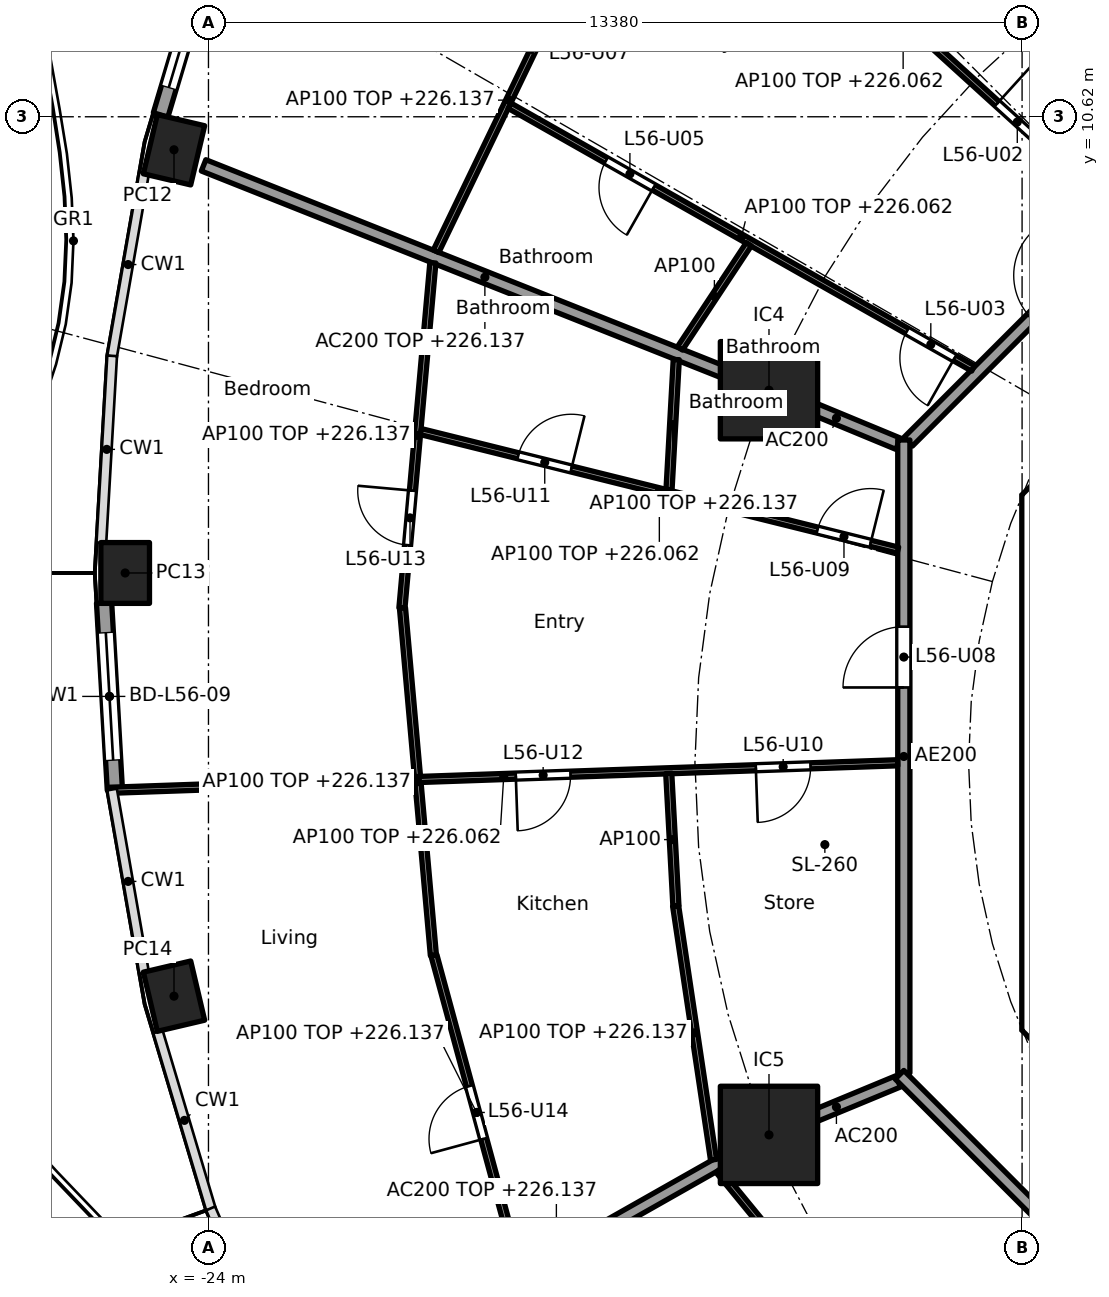
"""IFC4 building model, lengths in metres.
Left out: names, types, materials, properties, quantities, classifications, styles, units other than length and angle.
Written with IfcOpenShell. Run it as: python <this file> out.ifc"""

import sys

from ifc_helpers import new_model, si_unit, direction, frame, frame_2d, origin, origin_2d, place, context, subcontext, project, spatial, polyline, rectangle, hollow_rectangle, outline, extrude, element, fill, save


model = new_model("IFC4")
c1 = context("Model", 3, precision=1e-05, world=origin(), true_north=direction((0.0, 1.0)))
c2 = subcontext(c1, "Body", "Model", "MODEL_VIEW")
j1 = project(units=[si_unit("LENGTHUNIT", "METRE"), si_unit("PLANEANGLEUNIT", "RADIAN")], contexts=[c1])
p1 = place(None, origin())
s1 = spatial("IfcSite", under=j1, at=p1, CompositionType="ELEMENT")
p2 = place(p1, origin())
s2 = spatial("IfcBuilding", under=s1, at=p2, CompositionType="ELEMENT")
p3 = place(p2, frame((0.0, 0.0, 223.3)))
s3 = spatial("IfcBuildingStorey", under=s2, at=p3, CompositionType="ELEMENT", Elevation=223.3)
for number, where, z_axis, x_axis in (
    (1, (-24.567, 10.077, 0.0), (0.0, 0.0, 1.0), (-0.229, -0.973, 0.0)),
    (2, (-25.37, 3.118, 0.0), (0.0, 0.0, 1.0), (0.0, -1.0, 0.0)),
    (3, (-24.567, -3.842, 0.0), (0.0, 0.0, 1.0), (0.229, -0.973, 0.0)),
):
    element("IfcColumn", number, at=place(p3, frame(where, z_axis=z_axis, x_axis=x_axis)), inside=s3, PredefinedType="COLUMN", context=c2, shape_type="SweptSolid", body=[
        extrude(hollow_rectangle(XDim=1.0, YDim=0.8, WallThickness=0.032, at=origin_2d()), origin(), (0.0, 0.0, 1.0), 3.7),
    ])
for number, where, z_axis, x_axis in (
    (4, (-14.782, 6.123, 0.0), (0.0, 0.0, 1.0), (1.0, 0.0, 0.0)),
    (5, (-14.782, -6.123, 0.0), (0.0, 0.0, 1.0), (1.0, 0.0, 0.0)),
):
    element("IfcColumn", number, at=place(p3, frame(where, z_axis=z_axis, x_axis=x_axis)), inside=s3, PredefinedType="COLUMN", context=c2, shape_type="SweptSolid", body=[
        extrude(rectangle(XDim=1.6, YDim=1.6, at=origin_2d()), origin(), (0.0, 0.0, 1.0), 3.7),
    ])
p4 = place(p3, frame((-24.787, 10.65, 0.0), z_axis=(0.0, 0.0, 1.0), x_axis=(0.285859454825, 0.95827155446, 0.0)))
e6 = element("IfcWall", 6, at=p4, inside=s3, PredefinedType="SOLIDWALL", context=c2, shape_type="SweptSolid", body=[
    extrude(rectangle(XDim=3.041, YDim=0.25, at=frame_2d((1.52, 0.0))), origin(), (0.0, 0.0, 1.0), 3.44),
])
p5 = place(p4, frame((0.47, 0.0, 0.0)))
e7 = element("IfcOpeningElement", 7, at=p5, cuts=e6, PredefinedType="OPENING", context=c2, shape_type="SweptSolid", body=[
    extrude(rectangle(XDim=2.1, YDim=2.4, at=frame_2d((1.05, 1.2))), frame((0.0, 0.135, 0.0), z_axis=(0.0, -1.0, 0.0), x_axis=(1.0, 0.0, 0.0)), (0.0, 0.0, 1.0), 0.27),
])
p6 = place(p3, frame((-25.539, -0.45, 0.0), z_axis=(0.0, 0.0, 1.0), x_axis=(-0.057528189427, 0.998343882348, 0.0)))
e8 = element("IfcWall", 8, at=p6, inside=s3, PredefinedType="SOLIDWALL", context=c2, shape_type="SweptSolid", body=[
    extrude(rectangle(XDim=3.081, YDim=0.25, at=frame_2d((1.541, 0.0))), origin(), (0.0, 0.0, 1.0), 3.44),
])
p7 = place(p6, frame((0.49, 0.0, 0.0)))
e9 = element("IfcOpeningElement", 9, at=p7, cuts=e8, PredefinedType="OPENING", context=c2, shape_type="SweptSolid", body=[
    extrude(rectangle(XDim=2.1, YDim=2.4, at=frame_2d((1.05, 1.2))), frame((0.0, 0.135, 0.0), z_axis=(0.0, -1.0, 0.0), x_axis=(1.0, 0.0, 0.0)), (0.0, 0.0, 1.0), 0.27),
])
p8 = place(p3, frame((-10.325, 3.801, 0.0), z_axis=(0.0, 0.0, 1.0), x_axis=(0.0, -1.0, 0.0)))
e10 = element("IfcWall", 10, at=p8, inside=s3, PredefinedType="SHEAR", context=c2, shape_type="SweptSolid", body=[
    extrude(rectangle(XDim=7.602, YDim=0.6, at=frame_2d((3.801, 0.0))), origin(), (0.0, 0.0, 1.0), 3.44),
])
p9 = place(p8, frame((0.651, 0.0, 0.0)))
e11 = element("IfcOpeningElement", 11, at=p9, cuts=e10, PredefinedType="OPENING", context=c2, shape_type="SweptSolid", body=[
    extrude(rectangle(XDim=1.5, YDim=2.1, at=frame_2d((0.75, 1.05))), frame((0.0, 0.31, 0.0), z_axis=(0.0, -1.0, 0.0), x_axis=(1.0, 0.0, 0.0)), (0.0, 0.0, 1.0), 0.62),
])
p10 = place(p8, frame((5.451, 0.0, 0.0)))
e12 = element("IfcOpeningElement", 12, at=p10, cuts=e10, PredefinedType="OPENING", context=c2, shape_type="SweptSolid", body=[
    extrude(rectangle(XDim=1.5, YDim=2.1, at=frame_2d((0.75, 1.05))), frame((0.0, 0.31, 0.0), z_axis=(0.0, -1.0, 0.0), x_axis=(1.0, 0.0, 0.0)), (0.0, 0.0, 1.0), 0.62),
])
p11 = place(p3, origin())
e13 = element("IfcWall", 13, at=p11, inside=s3, PredefinedType="SHEAR", context=c2, shape_type="SweptSolid", body=[
    extrude(outline(polyline([(-10.625, -3.801), (-10.025, -3.801), (-10.025, -4.152), (-9.776, -4.401), (-10.2, -4.825), (-10.625, -4.401), (-10.625, -3.801)])), origin(), (0.0, 0.0, 1.0), 3.44),
])
p12 = place(p3, origin())
e14 = element("IfcWall", 14, at=p12, inside=s3, PredefinedType="SHEAR", context=c2, shape_type="SweptSolid", body=[
    extrude(outline(polyline([(-10.2, 4.825), (-9.776, 4.401), (-10.025, 4.152), (-10.025, 3.801), (-10.625, 3.801), (-10.625, 4.401), (-10.2, 4.825)])), origin(), (0.0, 0.0, 1.0), 3.44),
])
p13 = place(p3, frame((-12.657, 5.243, 0.0), z_axis=(0.0, 0.0, 1.0), x_axis=(-0.923859888513, 0.38273085373, 0.0)))
e15 = element("IfcWall", 15, at=p13, inside=s3, PredefinedType="PARTITIONING", context=c2, shape_type="SweptSolid", body=[
    extrude(rectangle(XDim=2.199, YDim=0.2, at=frame_2d((1.1, 0.0))), origin(), (0.0, 0.0, 1.0), 3.44),
])
p14 = place(p3, frame((-14.829, 6.141, 0.0), z_axis=(0.0, 0.0, 1.0), x_axis=(-0.929202069098, 0.36957206981, 0.0)))
e16 = element("IfcWall", 16, at=p14, inside=s3, PredefinedType="PARTITIONING", context=c2, shape_type="SweptSolid", body=[
    extrude(rectangle(XDim=9.957, YDim=0.2, at=frame_2d((4.978, 0.0))), origin(), (0.0, 0.0, 1.0), 2.837),
])
p15 = place(p3, frame((-12.657, -5.243, 0.0), z_axis=(0.0, 0.0, 1.0), x_axis=(-0.923859888513, -0.38273085373, 0.0)))
e17 = element("IfcWall", 17, at=p15, inside=s3, PredefinedType="PARTITIONING", context=c2, shape_type="SweptSolid", body=[
    extrude(rectangle(XDim=2.199, YDim=0.2, at=frame_2d((1.1, 0.0))), origin(), (0.0, 0.0, 1.0), 3.44),
])
p16 = place(p3, frame((-14.825, -6.148, 0.0), z_axis=(0.0, 0.0, 1.0), x_axis=(-0.870099576105, -0.492875975944, 0.0)))
e18 = element("IfcWall", 18, at=p16, inside=s3, PredefinedType="PARTITIONING", context=c2, shape_type="SweptSolid", body=[
    extrude(rectangle(XDim=7.937, YDim=0.2, at=frame_2d((3.969, 0.0))), origin(), (0.0, 0.0, 1.0), 2.837),
])
p17 = place(p3, frame((-5.275, 12.494, 0.0), z_axis=(0.0, 0.0, 1.0), x_axis=(-0.707106781187, -0.707106781187, 0.0)))
e19 = element("IfcWall", 19, at=p17, inside=s3, PredefinedType="PARTITIONING", context=c2, shape_type="SweptSolid", body=[
    extrude(rectangle(XDim=10.209, YDim=0.2, at=frame_2d((5.104, 0.0))), origin(), (0.0, 0.0, 1.0), 3.44),
])
p18 = place(p17, frame((6.339, 0.0, 0.0)))
e20 = element("IfcOpeningElement", 20, at=p18, cuts=e19, PredefinedType="OPENING", context=c2, shape_type="SweptSolid", body=[
    extrude(rectangle(XDim=1.0, YDim=2.1, at=frame_2d((0.5, 1.05))), frame((0.0, 0.11, 0.0), z_axis=(0.0, -1.0, 0.0), x_axis=(1.0, 0.0, 0.0)), (0.0, 0.0, 1.0), 0.22),
])
p19 = place(p3, frame((-12.565, 5.304, 0.0), z_axis=(0.0, 0.0, 1.0), x_axis=(0.0, -1.0, 0.0)))
e21 = element("IfcWall", 21, at=p19, inside=s3, PredefinedType="PARTITIONING", context=c2, shape_type="SweptSolid", body=[
    extrude(rectangle(XDim=10.409, YDim=0.2, at=frame_2d((5.205, 0.0))), origin(), (0.0, 0.0, 1.0), 3.44),
])
p20 = place(p19, frame((3.07, 0.0, 0.0)))
e22 = element("IfcOpeningElement", 22, at=p20, cuts=e21, PredefinedType="OPENING", context=c2, shape_type="SweptSolid", body=[
    extrude(rectangle(XDim=1.0, YDim=2.1, at=frame_2d((0.5, 1.05))), frame((0.0, 0.11, 0.0), z_axis=(0.0, -1.0, 0.0), x_axis=(1.0, 0.0, 0.0)), (0.0, 0.0, 1.0), 0.22),
])
p21 = place(p3, frame((-12.635, -5.134, 0.0), z_axis=(0.0, 0.0, 1.0), x_axis=(0.707106781187, -0.707106781187, 0.0)))
e23 = element("IfcWall", 23, at=p21, inside=s3, PredefinedType="PARTITIONING", context=c2, shape_type="SweptSolid", body=[
    extrude(rectangle(XDim=10.609, YDim=0.2, at=frame_2d((5.305, 0.0))), origin(), (0.0, 0.0, 1.0), 3.44),
])
p22 = place(p3, frame((-8.959, 8.952, 0.0), z_axis=(0.0, 0.0, 1.0), x_axis=(-0.740140081805, 0.672452719011, 0.0)))
e24 = element("IfcWall", 24, at=p22, inside=s3, PredefinedType="PARTITIONING", context=c2, shape_type="SweptSolid", body=[
    extrude(rectangle(XDim=9.775, YDim=0.1, at=frame_2d((4.887, 0.0))), origin(), (0.0, 0.0, 1.0), 2.762),
])
p23 = place(p22, frame((1.901, 0.0, 0.0)))
e25 = element("IfcOpeningElement", 25, at=p23, cuts=e24, PredefinedType="OPENING", context=c2, shape_type="SweptSolid", body=[
    extrude(rectangle(XDim=0.9, YDim=2.1, at=frame_2d((0.45, 1.05))), frame((0.0, 0.06, 0.0), z_axis=(0.0, -1.0, 0.0), x_axis=(1.0, 0.0, 0.0)), (0.0, 0.0, 1.0), 0.12),
])
p24 = place(p22, frame((6.789, 0.0, 0.0)))
e26 = element("IfcOpeningElement", 26, at=p24, cuts=e24, PredefinedType="OPENING", context=c2, shape_type="SweptSolid", body=[
    extrude(rectangle(XDim=0.9, YDim=2.1, at=frame_2d((0.45, 1.05))), frame((0.0, 0.06, 0.0), z_axis=(0.0, -1.0, 0.0), x_axis=(1.0, 0.0, 0.0)), (0.0, 0.0, 1.0), 0.12),
])
p25 = place(p3, frame((-17.861, 13.379, 0.0), z_axis=(0.0, 0.0, 1.0), x_axis=(-0.434302390612, -0.900767136117, 0.0)))
e27 = element("IfcWall", 27, at=p25, inside=s3, PredefinedType="PARTITIONING", context=c2, shape_type="SweptSolid", body=[
    extrude(rectangle(XDim=5.519, YDim=0.1, at=frame_2d((2.759, 0.0))), origin(), (0.0, 0.0, 1.0), 2.837),
])
p26 = place(p25, frame((0.992, 0.0, 0.0)))
e28 = element("IfcOpeningElement", 28, at=p26, cuts=e27, PredefinedType="OPENING", context=c2, shape_type="SweptSolid", body=[
    extrude(rectangle(XDim=0.9, YDim=2.1, at=frame_2d((0.45, 1.05))), frame((0.0, 0.06, 0.0), z_axis=(0.0, -1.0, 0.0), x_axis=(1.0, 0.0, 0.0)), (0.0, 0.0, 1.0), 0.12),
])
p27 = place(p3, frame((-11.425, 6.48, 0.0), z_axis=(0.0, 0.0, 1.0), x_axis=(-0.869969596547, 0.493105365094, 0.0)))
e29 = element("IfcWall", 29, at=p27, inside=s3, PredefinedType="PARTITIONING", context=c2, shape_type="SweptSolid", body=[
    extrude(rectangle(XDim=8.762, YDim=0.1, at=frame_2d((4.381, 0.0))), origin(), (0.0, 0.0, 1.0), 2.762),
])
p28 = place(p27, frame((0.35, 0.0, 0.0)))
e30 = element("IfcOpeningElement", 30, at=p28, cuts=e29, PredefinedType="OPENING", context=c2, shape_type="SweptSolid", body=[
    extrude(rectangle(XDim=0.9, YDim=2.1, at=frame_2d((0.45, 1.05))), frame((0.0, 0.06, 0.0), z_axis=(0.0, -1.0, 0.0), x_axis=(1.0, 0.0, 0.0)), (0.0, 0.0, 1.0), 0.12),
])
p29 = place(p27, frame((6.038, 0.0, 0.0)))
e31 = element("IfcOpeningElement", 31, at=p29, cuts=e29, PredefinedType="OPENING", context=c2, shape_type="SweptSolid", body=[
    extrude(rectangle(XDim=0.9, YDim=2.1, at=frame_2d((0.45, 1.05))), frame((0.0, 0.06, 0.0), z_axis=(0.0, -1.0, 0.0), x_axis=(1.0, 0.0, 0.0)), (0.0, 0.0, 1.0), 0.12),
])
p30 = place(p3, frame((-15.114, 8.524, 0.0), z_axis=(0.0, 0.0, 1.0), x_axis=(-0.551211457161, -0.834365585037, 0.0)))
e32 = element("IfcWall", 32, at=p30, inside=s3, PredefinedType="PARTITIONING", context=c2, shape_type="SweptSolid", body=[
    extrude(rectangle(XDim=2.054, YDim=0.1, at=frame_2d((1.027, 0.0))), origin(), (0.0, 0.0, 1.0), 3.44),
])
p31 = place(p3, frame((-16.307, 6.627, 0.0), z_axis=(0.0, 0.0, 1.0), x_axis=(-0.055608865939, -0.998452629837, 0.0)))
e33 = element("IfcWall", 33, at=p31, inside=s3, PredefinedType="PARTITIONING", context=c2, shape_type="SweptSolid", body=[
    extrude(rectangle(XDim=2.143, YDim=0.1, at=frame_2d((1.071, 0.0))), origin(), (0.0, 0.0, 1.0), 2.837),
])
p32 = place(p3, frame((-20.31, 8.218, 0.0), z_axis=(0.0, 0.0, 1.0), x_axis=(-0.089284106956, -0.996006198899, 0.0)))
e34 = element("IfcWall", 34, at=p32, inside=s3, PredefinedType="PARTITIONING", context=c2, shape_type="SweptSolid", body=[
    extrude(rectangle(XDim=5.698, YDim=0.1, at=frame_2d((2.849, 0.0))), origin(), (0.0, 0.0, 1.0), 2.837),
])
p33 = place(p32, frame((3.761, 0.0, 0.0)))
e35 = element("IfcOpeningElement", 35, at=p33, cuts=e34, PredefinedType="OPENING", context=c2, shape_type="SweptSolid", body=[
    extrude(rectangle(XDim=0.9, YDim=2.1, at=frame_2d((0.45, 1.05))), frame((0.0, 0.06, 0.0), z_axis=(0.0, -1.0, 0.0), x_axis=(1.0, 0.0, 0.0)), (0.0, 0.0, 1.0), 0.12),
])
p34 = place(p3, frame((-12.662, 3.494, 0.0), z_axis=(0.0, 0.0, 1.0), x_axis=(-0.970505526029, 0.241078874951, 0.0)))
e36 = element("IfcWall", 36, at=p34, inside=s3, PredefinedType="PARTITIONING", context=c2, shape_type="SweptSolid", body=[
    extrude(rectangle(XDim=8.085, YDim=0.1, at=frame_2d((4.043, 0.0))), origin(), (0.0, 0.0, 1.0), 2.762),
])
p35 = place(p34, frame((0.464, 0.0, 0.0)))
e37 = element("IfcOpeningElement", 37, at=p35, cuts=e36, PredefinedType="OPENING", context=c2, shape_type="SweptSolid", body=[
    extrude(rectangle(XDim=0.9, YDim=2.1, at=frame_2d((0.45, 1.05))), frame((0.0, 0.06, 0.0), z_axis=(0.0, -1.0, 0.0), x_axis=(1.0, 0.0, 0.0)), (0.0, 0.0, 1.0), 0.12),
])
p36 = place(p34, frame((5.535, 0.0, 0.0)))
e38 = element("IfcOpeningElement", 38, at=p36, cuts=e36, PredefinedType="OPENING", context=c2, shape_type="SweptSolid", body=[
    extrude(rectangle(XDim=0.9, YDim=2.1, at=frame_2d((0.45, 1.05))), frame((0.0, 0.06, 0.0), z_axis=(0.0, -1.0, 0.0), x_axis=(1.0, 0.0, 0.0)), (0.0, 0.0, 1.0), 0.12),
])
p37 = place(p3, frame((-20.81, 2.542, 0.0), z_axis=(0.0, 0.0, 1.0), x_axis=(0.088651453697, -0.996062708748, 0.0)))
e39 = element("IfcWall", 39, at=p37, inside=s3, PredefinedType="PARTITIONING", context=c2, shape_type="SweptSolid", body=[
    extrude(rectangle(XDim=5.737, YDim=0.1, at=frame_2d((2.868, 0.0))), origin(), (0.0, 0.0, 1.0), 2.837),
])
p38 = place(p3, frame((-12.665, -0.003, 0.0), z_axis=(0.0, 0.0, 1.0), x_axis=(-0.999390583608, -0.034906466382, 0.0)))
e40 = element("IfcWall", 40, at=p38, inside=s3, PredefinedType="PARTITIONING", context=c2, shape_type="SweptSolid", body=[
    extrude(rectangle(XDim=12.967, YDim=0.1, at=frame_2d((6.483, 0.0))), origin(), (0.0, 0.0, 1.0), 2.762),
])
p39 = place(p38, frame((1.435, 0.0, 0.0)))
e41 = element("IfcOpeningElement", 41, at=p39, cuts=e40, PredefinedType="OPENING", context=c2, shape_type="SweptSolid", body=[
    extrude(rectangle(XDim=0.9, YDim=2.1, at=frame_2d((0.45, 1.05))), frame((0.0, 0.06, 0.0), z_axis=(0.0, -1.0, 0.0), x_axis=(1.0, 0.0, 0.0)), (0.0, 0.0, 1.0), 0.12),
])
p40 = place(p38, frame((5.385, 0.0, 0.0)))
e42 = element("IfcOpeningElement", 42, at=p40, cuts=e40, PredefinedType="OPENING", context=c2, shape_type="SweptSolid", body=[
    extrude(rectangle(XDim=0.9, YDim=2.1, at=frame_2d((0.45, 1.05))), frame((0.0, 0.06, 0.0), z_axis=(0.0, -1.0, 0.0), x_axis=(1.0, 0.0, 0.0)), (0.0, 0.0, 1.0), 0.12),
])
p41 = place(p3, frame((-16.431, -0.178, 0.0), z_axis=(0.0, 0.0, 1.0), x_axis=(0.053951127036, -0.998543577362, 0.0)))
e43 = element("IfcWall", 43, at=p41, inside=s3, PredefinedType="PARTITIONING", context=c2, shape_type="SweptSolid", body=[
    extrude(rectangle(XDim=2.181, YDim=0.1, at=frame_2d((1.091, 0.0))), origin(), (0.0, 0.0, 1.0), 3.44),
])
p42 = place(p3, frame((-16.318, -2.356, 0.0), z_axis=(0.0, 0.0, 1.0), x_axis=(0.147684413341, -0.989034536331, 0.0)))
e44 = element("IfcWall", 44, at=p42, inside=s3, PredefinedType="PARTITIONING", context=c2, shape_type="SweptSolid", body=[
    extrude(rectangle(XDim=4.222, YDim=0.1, at=frame_2d((2.111, 0.0))), origin(), (0.0, 0.0, 1.0), 2.837),
])
p43 = place(p3, frame((-20.292, -3.17, 0.0), z_axis=(0.0, 0.0, 1.0), x_axis=(0.26187906236, -0.965100697698, 0.0)))
e45 = element("IfcWall", 45, at=p43, inside=s3, PredefinedType="PARTITIONING", context=c2, shape_type="SweptSolid", body=[
    extrude(rectangle(XDim=5.356, YDim=0.1, at=frame_2d((2.678, 0.0))), origin(), (0.0, 0.0, 1.0), 2.837),
])
p44 = place(p43, frame((2.228, 0.0, 0.0)))
e46 = element("IfcOpeningElement", 46, at=p44, cuts=e45, PredefinedType="OPENING", context=c2, shape_type="SweptSolid", body=[
    extrude(rectangle(XDim=0.9, YDim=2.1, at=frame_2d((0.45, 1.05))), frame((0.0, 0.06, 0.0), z_axis=(0.0, -1.0, 0.0), x_axis=(1.0, 0.0, 0.0)), (0.0, 0.0, 1.0), 0.12),
])
p45 = place(p3, frame((-15.616, -6.708, 0.0), z_axis=(0.0, 0.0, 1.0), x_axis=(0.634076422357, -0.773270386483, 0.0)))
e47 = element("IfcWall", 47, at=p45, inside=s3, PredefinedType="PARTITIONING", context=c2, shape_type="SweptSolid", body=[
    extrude(rectangle(XDim=4.611, YDim=0.1, at=frame_2d((2.306, 0.0))), origin(), (0.0, 0.0, 1.0), 2.837),
])
p46 = place(p5, origin())
e48 = element("IfcDoor", 48, at=p46, inside=s3, OperationType="SLIDING_TO_LEFT", PredefinedType="DOOR", context=c2, shape_type="SweptSolid", body=[
    extrude(rectangle(XDim=2.1, YDim=2.4, at=frame_2d((1.05, 1.2))), frame((0.0, 0.025, 0.0), z_axis=(0.0, -1.0, 0.0), x_axis=(1.0, 0.0, 0.0)), (0.0, 0.0, 1.0), 0.05),
])
fill(e7, e48)
p47 = place(p7, origin())
e49 = element("IfcDoor", 49, at=p47, inside=s3, OperationType="SLIDING_TO_LEFT", PredefinedType="DOOR", context=c2, shape_type="SweptSolid", body=[
    extrude(rectangle(XDim=2.1, YDim=2.4, at=frame_2d((1.05, 1.2))), frame((0.0, 0.025, 0.0), z_axis=(0.0, -1.0, 0.0), x_axis=(1.0, 0.0, 0.0)), (0.0, 0.0, 1.0), 0.05),
])
fill(e9, e49)
p48 = place(p23, frame((0.9, 0.0, 0.0), x_axis=(-1.0, 0.0, 0.0)))
e50 = element("IfcDoor", 50, at=p48, inside=s3, OperationType="SINGLE_SWING_LEFT", PredefinedType="DOOR", context=c2, shape_type="SweptSolid", body=[
    extrude(rectangle(XDim=0.9, YDim=2.1, at=frame_2d((0.45, 1.05))), frame((0.0, 0.025, 0.0), z_axis=(0.0, -1.0, 0.0), x_axis=(1.0, 0.0, 0.0)), (0.0, 0.0, 1.0), 0.05),
])
fill(e25, e50)
p49 = place(p28, origin())
e51 = element("IfcDoor", 51, at=p49, inside=s3, OperationType="SINGLE_SWING_LEFT", PredefinedType="DOOR", context=c2, shape_type="SweptSolid", body=[
    extrude(rectangle(XDim=0.9, YDim=2.1, at=frame_2d((0.45, 1.05))), frame((0.0, 0.025, 0.0), z_axis=(0.0, -1.0, 0.0), x_axis=(1.0, 0.0, 0.0)), (0.0, 0.0, 1.0), 0.05),
])
fill(e30, e51)
p50 = place(p29, origin())
e52 = element("IfcDoor", 52, at=p50, inside=s3, OperationType="SINGLE_SWING_LEFT", PredefinedType="DOOR", context=c2, shape_type="SweptSolid", body=[
    extrude(rectangle(XDim=0.9, YDim=2.1, at=frame_2d((0.45, 1.05))), frame((0.0, 0.025, 0.0), z_axis=(0.0, -1.0, 0.0), x_axis=(1.0, 0.0, 0.0)), (0.0, 0.0, 1.0), 0.05),
])
fill(e31, e52)
p51 = place(p26, frame((0.9, 0.0, 0.0), x_axis=(-1.0, 0.0, 0.0)))
e53 = element("IfcDoor", 53, at=p51, inside=s3, OperationType="SINGLE_SWING_RIGHT", PredefinedType="DOOR", context=c2, shape_type="SweptSolid", body=[
    extrude(rectangle(XDim=0.9, YDim=2.1, at=frame_2d((0.45, 1.05))), frame((0.0, 0.025, 0.0), z_axis=(0.0, -1.0, 0.0), x_axis=(1.0, 0.0, 0.0)), (0.0, 0.0, 1.0), 0.05),
])
fill(e28, e53)
p52 = place(p20, frame((1.0, 0.0, 0.0), x_axis=(-1.0, 0.0, 0.0)))
e54 = element("IfcDoor", 54, at=p52, inside=s3, OperationType="SINGLE_SWING_LEFT", PredefinedType="DOOR", context=c2, shape_type="SweptSolid", body=[
    extrude(rectangle(XDim=1.0, YDim=2.1, at=frame_2d((0.5, 1.05))), frame((0.0, 0.025, 0.0), z_axis=(0.0, -1.0, 0.0), x_axis=(1.0, 0.0, 0.0)), (0.0, 0.0, 1.0), 0.05),
])
fill(e22, e54)
p53 = place(p35, frame((0.9, 0.0, 0.0), x_axis=(-1.0, 0.0, 0.0)))
e55 = element("IfcDoor", 55, at=p53, inside=s3, OperationType="SINGLE_SWING_RIGHT", PredefinedType="DOOR", context=c2, shape_type="SweptSolid", body=[
    extrude(rectangle(XDim=0.9, YDim=2.1, at=frame_2d((0.45, 1.05))), frame((0.0, 0.025, 0.0), z_axis=(0.0, -1.0, 0.0), x_axis=(1.0, 0.0, 0.0)), (0.0, 0.0, 1.0), 0.05),
])
fill(e37, e55)
p54 = place(p39, origin())
e56 = element("IfcDoor", 56, at=p54, inside=s3, OperationType="SINGLE_SWING_RIGHT", PredefinedType="DOOR", context=c2, shape_type="SweptSolid", body=[
    extrude(rectangle(XDim=0.9, YDim=2.1, at=frame_2d((0.45, 1.05))), frame((0.0, 0.025, 0.0), z_axis=(0.0, -1.0, 0.0), x_axis=(1.0, 0.0, 0.0)), (0.0, 0.0, 1.0), 0.05),
])
fill(e41, e56)
p55 = place(p36, frame((0.9, 0.0, 0.0), x_axis=(-1.0, 0.0, 0.0)))
e57 = element("IfcDoor", 57, at=p55, inside=s3, OperationType="SINGLE_SWING_RIGHT", PredefinedType="DOOR", context=c2, shape_type="SweptSolid", body=[
    extrude(rectangle(XDim=0.9, YDim=2.1, at=frame_2d((0.45, 1.05))), frame((0.0, 0.025, 0.0), z_axis=(0.0, -1.0, 0.0), x_axis=(1.0, 0.0, 0.0)), (0.0, 0.0, 1.0), 0.05),
])
fill(e38, e57)
p56 = place(p40, origin())
e58 = element("IfcDoor", 58, at=p56, inside=s3, OperationType="SINGLE_SWING_RIGHT", PredefinedType="DOOR", context=c2, shape_type="SweptSolid", body=[
    extrude(rectangle(XDim=0.9, YDim=2.1, at=frame_2d((0.45, 1.05))), frame((0.0, 0.025, 0.0), z_axis=(0.0, -1.0, 0.0), x_axis=(1.0, 0.0, 0.0)), (0.0, 0.0, 1.0), 0.05),
])
fill(e42, e58)
p57 = place(p33, frame((0.9, 0.0, 0.0), x_axis=(-1.0, 0.0, 0.0)))
e59 = element("IfcDoor", 59, at=p57, inside=s3, OperationType="SINGLE_SWING_RIGHT", PredefinedType="DOOR", context=c2, shape_type="SweptSolid", body=[
    extrude(rectangle(XDim=0.9, YDim=2.1, at=frame_2d((0.45, 1.05))), frame((0.0, 0.025, 0.0), z_axis=(0.0, -1.0, 0.0), x_axis=(1.0, 0.0, 0.0)), (0.0, 0.0, 1.0), 0.05),
])
fill(e35, e59)
p58 = place(p44, frame((0.9, 0.0, 0.0), x_axis=(-1.0, 0.0, 0.0)))
e60 = element("IfcDoor", 60, at=p58, inside=s3, OperationType="SINGLE_SWING_LEFT", PredefinedType="DOOR", context=c2, shape_type="SweptSolid", body=[
    extrude(rectangle(XDim=0.9, YDim=2.1, at=frame_2d((0.45, 1.05))), frame((0.0, 0.025, 0.0), z_axis=(0.0, -1.0, 0.0), x_axis=(1.0, 0.0, 0.0)), (0.0, 0.0, 1.0), 0.05),
])
fill(e46, e60)
save(model, sys.argv[1])
